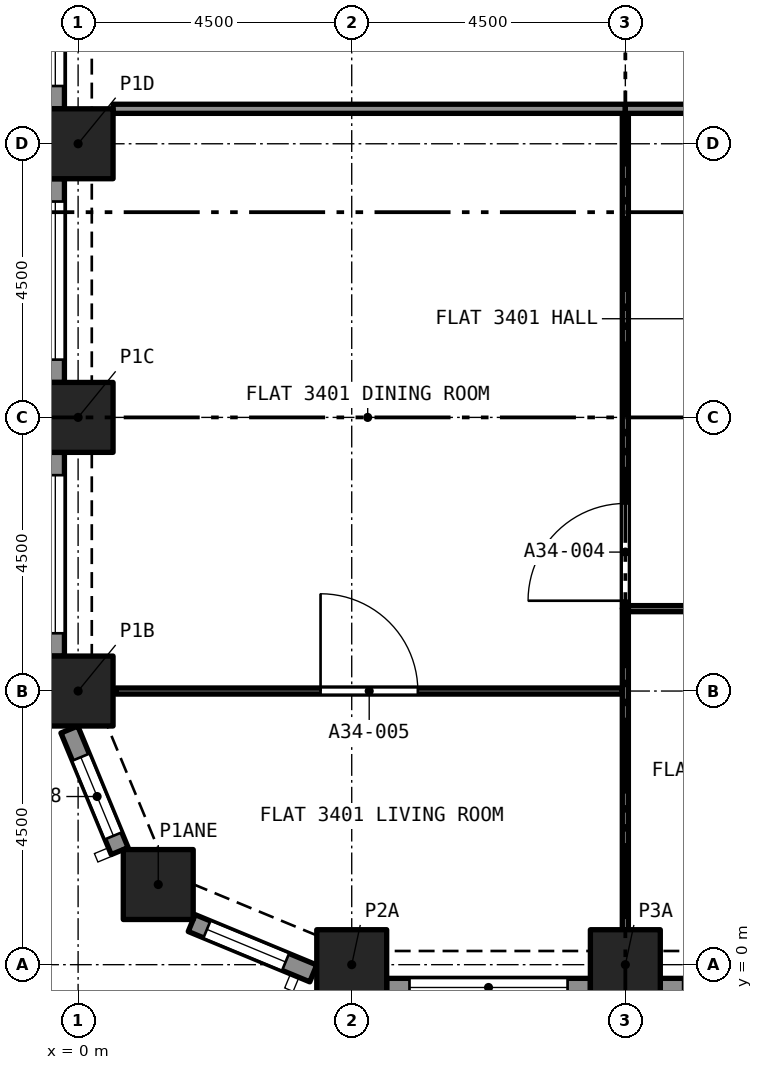
"""IFC4 building model, lengths in metres.
Left out: names, types, materials, properties, quantities, classifications, styles, units other than length and angle.
Written with IfcOpenShell. Run it as: python <this file> out.ifc"""

import sys

from ifc_helpers import new_model, si_unit, direction, frame, frame_2d, origin, origin_2d, place, context, subcontext, project, spatial, rectangle, extrude, element, fill, save


model = new_model("IFC4")
c1 = context("Model", 3, precision=1e-05, world=origin(), true_north=direction((0.0, 1.0)))
c2 = subcontext(c1, "Body", "Model", "MODEL_VIEW")
j1 = project(units=[si_unit("LENGTHUNIT", "METRE"), si_unit("PLANEANGLEUNIT", "RADIAN")], contexts=[c1])
p1 = place(None, origin())
s1 = spatial("IfcSite", under=j1, at=p1, CompositionType="ELEMENT")
p2 = place(p1, origin())
s2 = spatial("IfcBuilding", under=s1, at=p2, CompositionType="ELEMENT")
p3 = place(p2, frame((0.0, 0.0, 121.6)))
s3 = spatial("IfcBuildingStorey", under=s2, at=p3, CompositionType="ELEMENT", Elevation=121.6)
for number, where, z_axis, x_axis in (
    (1, (4.5, 0.0, 0.0), (0.0, 0.0, 1.0), (1.0, 0.0, 0.0)),
    (2, (9.0, 0.0, 0.0), (0.0, 0.0, 1.0), (1.0, 0.0, 0.0)),
    (3, (1.318, 1.318, 0.0), (0.0, 0.0, 1.0), (1.0, 0.0, 0.0)),
    (4, (0.0, 4.5, 0.0), (0.0, 0.0, 1.0), (1.0, 0.0, 0.0)),
    (5, (0.0, 9.0, 0.0), (0.0, 0.0, 1.0), (1.0, 0.0, 0.0)),
    (6, (0.0, 13.5, 0.0), (0.0, 0.0, 1.0), (1.0, 0.0, 0.0)),
):
    element("IfcColumn", number, at=place(p3, frame(where, z_axis=z_axis, x_axis=x_axis)), inside=s3, PredefinedType="COLUMN", context=c2, shape_type="SweptSolid", body=[
        extrude(rectangle(XDim=1.15, YDim=1.15, at=origin_2d()), origin(), (0.0, 0.0, 1.0), 3.2),
    ])
p4 = place(p3, frame((0.684, 1.869, 0.0), z_axis=(0.0, 0.0, 1.0), x_axis=(-0.382723818695, 0.923862802911, 0.0)))
e7 = element("IfcWall", 7, at=p4, inside=s3, PredefinedType="SOLIDWALL", context=c2, shape_type="SweptSolid", body=[
    extrude(rectangle(XDim=2.164, YDim=0.3, at=frame_2d((1.082, 0.0))), origin(), (0.0, 0.0, 1.0), 3.2),
])
p5 = place(p4, frame((0.271, 0.0, 0.45)))
e8 = element("IfcOpeningElement", 8, at=p5, cuts=e7, PredefinedType="OPENING", context=c2, shape_type="SweptSolid", body=[
    extrude(rectangle(XDim=1.4, YDim=1.95, at=frame_2d((0.7, 0.975))), frame((0.0, 0.16, 0.0), z_axis=(0.0, -1.0, 0.0), x_axis=(1.0, 0.0, 0.0)), (0.0, 0.0, 1.0), 0.32),
])
p6 = place(p3, frame((3.868, -0.144, 0.0), z_axis=(0.0, 0.0, 1.0), x_axis=(-0.923862802911, 0.382723818695, 0.0)))
e9 = element("IfcWall", 9, at=p6, inside=s3, PredefinedType="SOLIDWALL", context=c2, shape_type="SweptSolid", body=[
    extrude(rectangle(XDim=2.164, YDim=0.3, at=frame_2d((1.082, 0.0))), origin(), (0.0, 0.0, 1.0), 3.2),
])
p7 = place(p6, frame((0.493, 0.0, 0.45)))
e10 = element("IfcOpeningElement", 10, at=p7, cuts=e9, PredefinedType="OPENING", context=c2, shape_type="SweptSolid", body=[
    extrude(rectangle(XDim=1.4, YDim=1.95, at=frame_2d((0.7, 0.975))), frame((0.0, 0.16, 0.0), z_axis=(0.0, -1.0, 0.0), x_axis=(1.0, 0.0, 0.0)), (0.0, 0.0, 1.0), 0.32),
])
p8 = place(p3, frame((8.425, -0.375, 0.0), z_axis=(0.0, 0.0, 1.0), x_axis=(-1.0, 0.0, 0.0)))
e11 = element("IfcWall", 11, at=p8, inside=s3, PredefinedType="SOLIDWALL", context=c2, shape_type="SweptSolid", body=[
    extrude(rectangle(XDim=3.35, YDim=0.3, at=frame_2d((1.675, 0.0))), origin(), (0.0, 0.0, 1.0), 3.2),
])
p9 = place(p8, frame((0.375, 0.0, 0.45)))
e12 = element("IfcOpeningElement", 12, at=p9, cuts=e11, PredefinedType="OPENING", context=c2, shape_type="SweptSolid", body=[
    extrude(rectangle(XDim=2.6, YDim=1.95, at=frame_2d((1.3, 0.975))), frame((0.0, 0.16, 0.0), z_axis=(0.0, -1.0, 0.0), x_axis=(1.0, 0.0, 0.0)), (0.0, 0.0, 1.0), 0.32),
])
p10 = place(p3, frame((12.925, -0.375, 0.0), z_axis=(0.0, 0.0, 1.0), x_axis=(-1.0, 0.0, 0.0)))
e13 = element("IfcWall", 13, at=p10, inside=s3, PredefinedType="SOLIDWALL", context=c2, shape_type="SweptSolid", body=[
    extrude(rectangle(XDim=3.35, YDim=0.3, at=frame_2d((1.675, 0.0))), origin(), (0.0, 0.0, 1.0), 3.2),
])
p11 = place(p10, frame((0.375, 0.0, 0.45)))
e14 = element("IfcOpeningElement", 14, at=p11, cuts=e13, PredefinedType="OPENING", context=c2, shape_type="SweptSolid", body=[
    extrude(rectangle(XDim=2.6, YDim=1.95, at=frame_2d((1.3, 0.975))), frame((0.0, 0.16, 0.0), z_axis=(0.0, -1.0, 0.0), x_axis=(1.0, 0.0, 0.0)), (0.0, 0.0, 1.0), 0.32),
])
p12 = place(p3, frame((-0.375, 14.075, 0.0), z_axis=(0.0, 0.0, 1.0), x_axis=(0.0, 1.0, 0.0)))
e15 = element("IfcWall", 15, at=p12, inside=s3, PredefinedType="SOLIDWALL", context=c2, shape_type="SweptSolid", body=[
    extrude(rectangle(XDim=3.35, YDim=0.3, at=frame_2d((1.675, 0.0))), origin(), (0.0, 0.0, 1.0), 3.2),
])
p13 = place(p12, frame((0.375, 0.0, 0.45)))
e16 = element("IfcOpeningElement", 16, at=p13, cuts=e15, PredefinedType="OPENING", context=c2, shape_type="SweptSolid", body=[
    extrude(rectangle(XDim=2.6, YDim=1.95, at=frame_2d((1.3, 0.975))), frame((0.0, 0.16, 0.0), z_axis=(0.0, -1.0, 0.0), x_axis=(1.0, 0.0, 0.0)), (0.0, 0.0, 1.0), 0.32),
])
p14 = place(p3, frame((-0.375, 9.575, 0.0), z_axis=(0.0, 0.0, 1.0), x_axis=(0.0, 1.0, 0.0)))
e17 = element("IfcWall", 17, at=p14, inside=s3, PredefinedType="SOLIDWALL", context=c2, shape_type="SweptSolid", body=[
    extrude(rectangle(XDim=3.35, YDim=0.3, at=frame_2d((1.675, 0.0))), origin(), (0.0, 0.0, 1.0), 3.2),
])
p15 = place(p14, frame((0.375, 0.0, 0.45)))
e18 = element("IfcOpeningElement", 18, at=p15, cuts=e17, PredefinedType="OPENING", context=c2, shape_type="SweptSolid", body=[
    extrude(rectangle(XDim=2.6, YDim=1.95, at=frame_2d((1.3, 0.975))), frame((0.0, 0.16, 0.0), z_axis=(0.0, -1.0, 0.0), x_axis=(1.0, 0.0, 0.0)), (0.0, 0.0, 1.0), 0.32),
])
p16 = place(p3, frame((-0.375, 5.075, 0.0), z_axis=(0.0, 0.0, 1.0), x_axis=(0.0, 1.0, 0.0)))
e19 = element("IfcWall", 19, at=p16, inside=s3, PredefinedType="SOLIDWALL", context=c2, shape_type="SweptSolid", body=[
    extrude(rectangle(XDim=3.35, YDim=0.3, at=frame_2d((1.675, 0.0))), origin(), (0.0, 0.0, 1.0), 3.2),
])
p17 = place(p16, frame((0.375, 0.0, 0.45)))
e20 = element("IfcOpeningElement", 20, at=p17, cuts=e19, PredefinedType="OPENING", context=c2, shape_type="SweptSolid", body=[
    extrude(rectangle(XDim=2.6, YDim=1.95, at=frame_2d((1.3, 0.975))), frame((0.0, 0.16, 0.0), z_axis=(0.0, -1.0, 0.0), x_axis=(1.0, 0.0, 0.0)), (0.0, 0.0, 1.0), 0.32),
])
p18 = place(p3, frame((13.5, 5.855, 0.0), z_axis=(0.0, 0.0, 1.0), x_axis=(-1.0, 0.0, 0.0)))
e21 = element("IfcWall", 21, at=p18, inside=s3, PredefinedType="PARTITIONING", context=c2, shape_type="SweptSolid", body=[
    extrude(rectangle(XDim=4.45, YDim=0.1, at=frame_2d((2.225, 0.0))), origin(), (0.0, 0.0, 1.0), 2.85),
])
p19 = place(p18, frame((1.8, 0.0, 0.0)))
e22 = element("IfcOpeningElement", 22, at=p19, cuts=e21, PredefinedType="OPENING", context=c2, shape_type="SweptSolid", body=[
    extrude(rectangle(XDim=0.9, YDim=2.1, at=frame_2d((0.45, 1.05))), frame((0.0, 0.06, 0.0), z_axis=(0.0, -1.0, 0.0), x_axis=(1.0, 0.0, 0.0)), (0.0, 0.0, 1.0), 0.12),
])
p20 = place(p3, frame((9.0, 0.575, 0.0), z_axis=(0.0, 0.0, 1.0), x_axis=(0.0, 1.0, 0.0)))
e23 = element("IfcWall", 23, at=p20, inside=s3, PredefinedType="PARTITIONING", context=c2, shape_type="SweptSolid", body=[
    extrude(rectangle(XDim=5.28, YDim=0.1, at=frame_2d((2.64, 0.0))), origin(), (0.0, 0.0, 1.0), 2.85),
])
p21 = place(p3, frame((9.0, 5.855, 0.0), z_axis=(0.0, 0.0, 1.0), x_axis=(0.0, 1.0, 0.0)))
e24 = element("IfcWall", 24, at=p21, inside=s3, PredefinedType="PARTITIONING", context=c2, shape_type="SweptSolid", body=[
    extrude(rectangle(XDim=8.145, YDim=0.1, at=frame_2d((4.073, 0.0))), origin(), (0.0, 0.0, 1.0), 2.85),
])
p22 = place(p21, frame((0.13, 0.0, 0.0)))
e25 = element("IfcOpeningElement", 25, at=p22, cuts=e24, PredefinedType="OPENING", context=c2, shape_type="SweptSolid", body=[
    extrude(rectangle(XDim=1.6, YDim=2.1, at=frame_2d((0.8, 1.05))), frame((0.0, 0.06, 0.0), z_axis=(0.0, -1.0, 0.0), x_axis=(1.0, 0.0, 0.0)), (0.0, 0.0, 1.0), 0.12),
])
p23 = place(p3, frame((0.622, 4.5, 0.0), z_axis=(0.0, 0.0, 1.0), x_axis=(1.0, 0.0, 0.0)))
e26 = element("IfcWall", 26, at=p23, inside=s3, PredefinedType="PARTITIONING", context=c2, shape_type="SweptSolid", body=[
    extrude(rectangle(XDim=8.328, YDim=0.1, at=frame_2d((4.164, 0.0))), origin(), (0.0, 0.0, 1.0), 2.85),
])
p24 = place(p23, frame((3.365, 0.0, 0.0)))
e27 = element("IfcOpeningElement", 27, at=p24, cuts=e26, PredefinedType="OPENING", context=c2, shape_type="SweptSolid", body=[
    extrude(rectangle(XDim=1.6, YDim=2.1, at=frame_2d((0.8, 1.05))), frame((0.0, 0.06, 0.0), z_axis=(0.0, -1.0, 0.0), x_axis=(1.0, 0.0, 0.0)), (0.0, 0.0, 1.0), 0.12),
])
p25 = place(p3, frame((0.575, 14.075, 0.0), z_axis=(0.0, 0.0, 1.0), x_axis=(1.0, 0.0, 0.0)))
e28 = element("IfcWall", 28, at=p25, inside=s3, PredefinedType="PARTITIONING", context=c2, shape_type="SweptSolid", body=[
    extrude(rectangle(XDim=8.425, YDim=0.15, at=frame_2d((4.212, 0.0))), origin(), (0.0, 0.0, 1.0), 2.85),
])
p26 = place(p3, frame((11.925, 14.075, 0.0), z_axis=(0.0, 0.0, 1.0), x_axis=(-1.0, 0.0, 0.0)))
e29 = element("IfcWall", 29, at=p26, inside=s3, PredefinedType="PARTITIONING", context=c2, shape_type="SweptSolid", body=[
    extrude(rectangle(XDim=2.925, YDim=0.15, at=frame_2d((1.462, 0.0))), origin(), (0.0, 0.0, 1.0), 2.85),
])
p27 = place(p26, frame((0.175, 0.0, 0.0)))
e30 = element("IfcOpeningElement", 30, at=p27, cuts=e29, PredefinedType="OPENING", context=c2, shape_type="SweptSolid", body=[
    extrude(rectangle(XDim=1.0, YDim=2.1, at=frame_2d((0.5, 1.05))), frame((0.0, 0.085, 0.0), z_axis=(0.0, -1.0, 0.0), x_axis=(1.0, 0.0, 0.0)), (0.0, 0.0, 1.0), 0.17),
])
p28 = place(p5, origin())
e31 = element("IfcWindow", 31, at=p28, inside=s3, PartitioningType="SINGLE_PANEL", PredefinedType="WINDOW", context=c2, shape_type="SweptSolid", body=[
    extrude(rectangle(XDim=1.4, YDim=1.95, at=frame_2d((0.7, 0.975))), frame((0.0, 0.03, 0.0), z_axis=(0.0, -1.0, 0.0), x_axis=(1.0, 0.0, 0.0)), (0.0, 0.0, 1.0), 0.06),
])
fill(e8, e31)
p29 = place(p7, origin())
e32 = element("IfcWindow", 32, at=p29, inside=s3, PartitioningType="SINGLE_PANEL", PredefinedType="WINDOW", context=c2, shape_type="SweptSolid", body=[
    extrude(rectangle(XDim=1.4, YDim=1.95, at=frame_2d((0.7, 0.975))), frame((0.0, 0.03, 0.0), z_axis=(0.0, -1.0, 0.0), x_axis=(1.0, 0.0, 0.0)), (0.0, 0.0, 1.0), 0.06),
])
fill(e10, e32)
p30 = place(p9, origin())
e33 = element("IfcWindow", 33, at=p30, inside=s3, PartitioningType="SINGLE_PANEL", PredefinedType="WINDOW", context=c2, shape_type="SweptSolid", body=[
    extrude(rectangle(XDim=2.6, YDim=1.95, at=frame_2d((1.3, 0.975))), frame((0.0, 0.03, 0.0), z_axis=(0.0, -1.0, 0.0), x_axis=(1.0, 0.0, 0.0)), (0.0, 0.0, 1.0), 0.06),
])
fill(e12, e33)
p31 = place(p13, origin())
e34 = element("IfcWindow", 34, at=p31, inside=s3, PartitioningType="SINGLE_PANEL", PredefinedType="WINDOW", context=c2, shape_type="SweptSolid", body=[
    extrude(rectangle(XDim=2.6, YDim=1.95, at=frame_2d((1.3, 0.975))), frame((0.0, 0.03, 0.0), z_axis=(0.0, -1.0, 0.0), x_axis=(1.0, 0.0, 0.0)), (0.0, 0.0, 1.0), 0.06),
])
fill(e16, e34)
p32 = place(p15, origin())
e35 = element("IfcWindow", 35, at=p32, inside=s3, PartitioningType="SINGLE_PANEL", PredefinedType="WINDOW", context=c2, shape_type="SweptSolid", body=[
    extrude(rectangle(XDim=2.6, YDim=1.95, at=frame_2d((1.3, 0.975))), frame((0.0, 0.03, 0.0), z_axis=(0.0, -1.0, 0.0), x_axis=(1.0, 0.0, 0.0)), (0.0, 0.0, 1.0), 0.06),
])
fill(e18, e35)
p33 = place(p17, origin())
e36 = element("IfcWindow", 36, at=p33, inside=s3, PartitioningType="SINGLE_PANEL", PredefinedType="WINDOW", context=c2, shape_type="SweptSolid", body=[
    extrude(rectangle(XDim=2.6, YDim=1.95, at=frame_2d((1.3, 0.975))), frame((0.0, 0.03, 0.0), z_axis=(0.0, -1.0, 0.0), x_axis=(1.0, 0.0, 0.0)), (0.0, 0.0, 1.0), 0.06),
])
fill(e20, e36)
p34 = place(p22, origin())
e37 = element("IfcDoor", 37, at=p34, inside=s3, OperationType="SINGLE_SWING_LEFT", PredefinedType="DOOR", context=c2, shape_type="SweptSolid", body=[
    extrude(rectangle(XDim=1.6, YDim=2.1, at=frame_2d((0.8, 1.05))), frame((0.0, 0.025, 0.0), z_axis=(0.0, -1.0, 0.0), x_axis=(1.0, 0.0, 0.0)), (0.0, 0.0, 1.0), 0.05),
])
fill(e25, e37)
p35 = place(p24, origin())
e38 = element("IfcDoor", 38, at=p35, inside=s3, OperationType="SINGLE_SWING_RIGHT", PredefinedType="DOOR", context=c2, shape_type="SweptSolid", body=[
    extrude(rectangle(XDim=1.6, YDim=2.1, at=frame_2d((0.8, 1.05))), frame((0.0, 0.025, 0.0), z_axis=(0.0, -1.0, 0.0), x_axis=(1.0, 0.0, 0.0)), (0.0, 0.0, 1.0), 0.05),
])
fill(e27, e38)
save(model, sys.argv[1])
